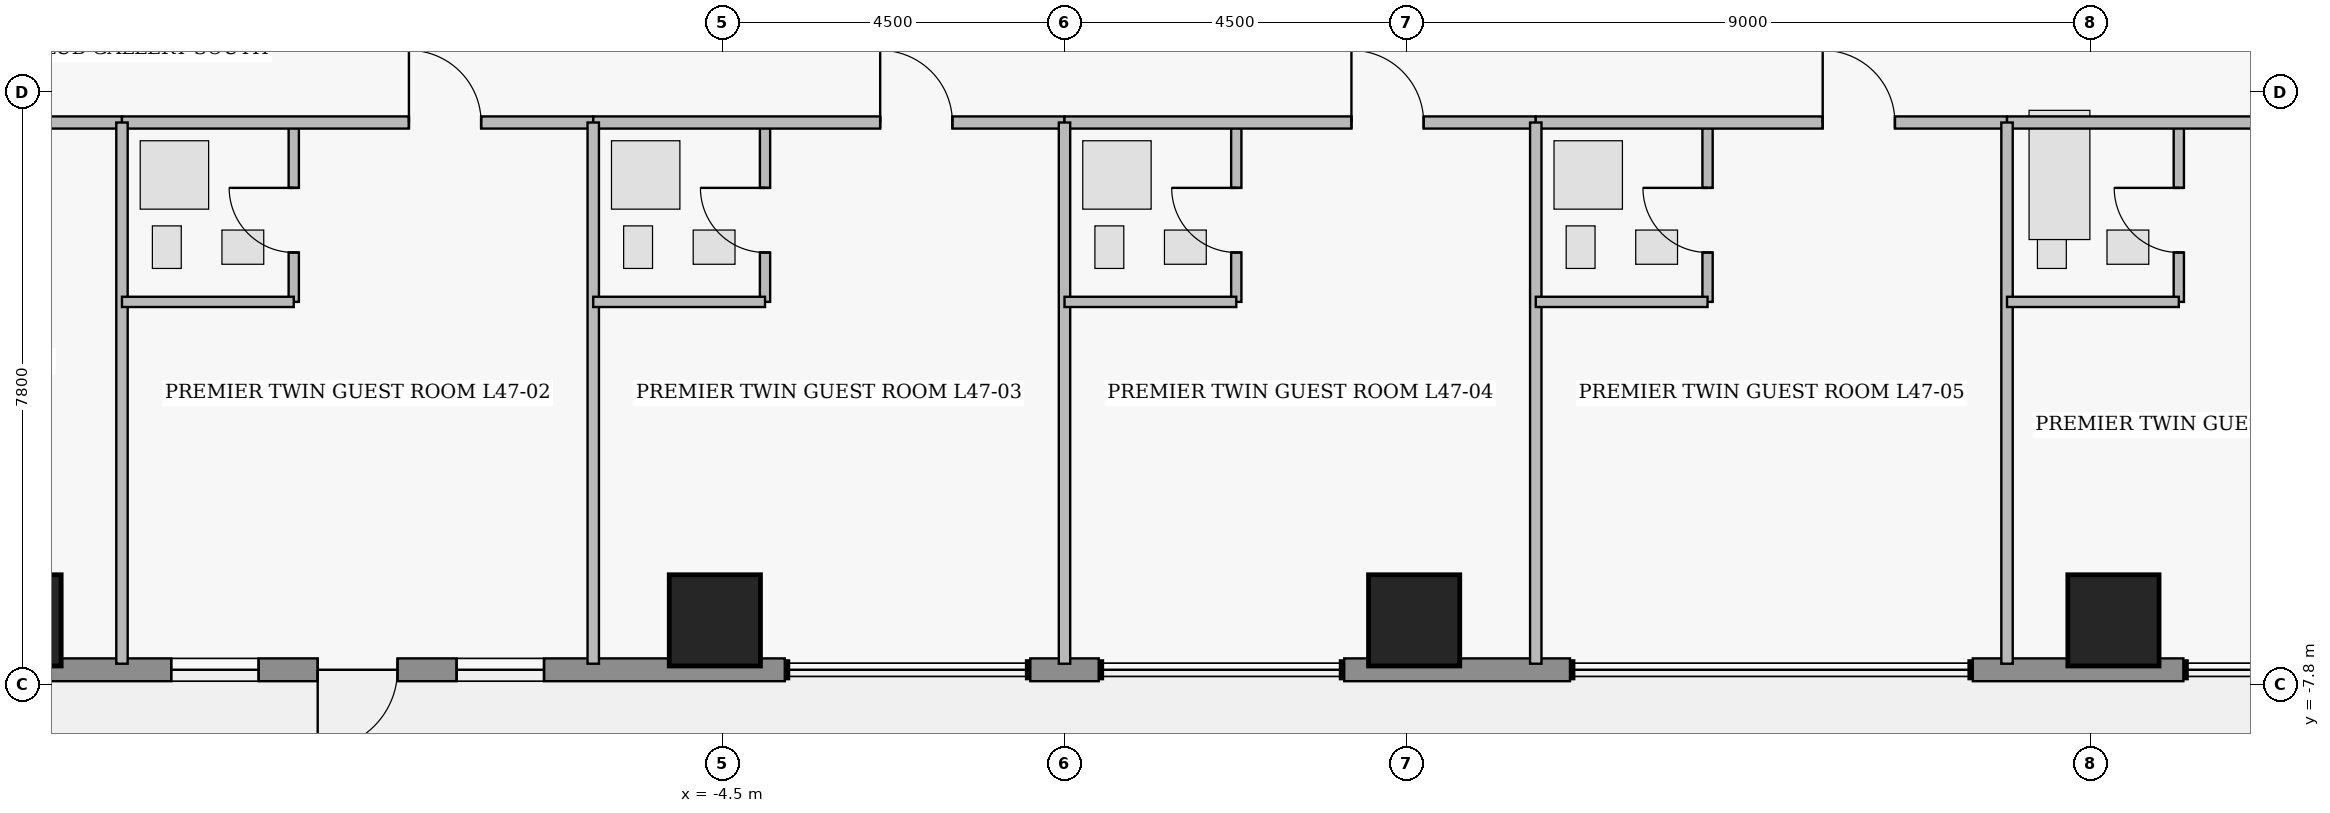
"""IFC4 building model, lengths in metres.
Left out: names, types, materials, properties, quantities, classifications, styles, units other than length and angle.
Written with IfcOpenShell. Run it as: python <this file> out.ifc"""

import sys

from ifc_helpers import new_model, si_unit, direction, frame, frame_2d, origin, origin_2d, place, context, subcontext, project, spatial, rectangle, extrude, element, fill, save


model = new_model("IFC4")
c1 = context("Model", 3, precision=1e-05, world=origin(), true_north=direction((0.0, 1.0)))
c2 = subcontext(c1, "Body", "Model", "MODEL_VIEW")
j1 = project(units=[si_unit("LENGTHUNIT", "METRE"), si_unit("PLANEANGLEUNIT", "RADIAN")], contexts=[c1])
p1 = place(None, origin())
s1 = spatial("IfcSite", under=j1, at=p1, CompositionType="ELEMENT")
p2 = place(p1, origin())
s2 = spatial("IfcBuilding", under=s1, at=p2, CompositionType="ELEMENT")
p3 = place(p2, frame((0.0, 0.0, 188.65)))
s3 = spatial("IfcBuildingStorey", under=s2, at=p3, CompositionType="ELEMENT", Elevation=188.65)
for number, where, z_axis, x_axis in (
    (1, (-13.8, -6.95, 0.0), (0.0, 0.0, 1.0), (1.0, 0.0, 0.0)),
    (2, (-4.6, -6.95, 0.0), (0.0, 0.0, 1.0), (1.0, 0.0, 0.0)),
    (3, (4.6, -6.95, 0.0), (0.0, 0.0, 1.0), (1.0, 0.0, 0.0)),
    (4, (13.8, -6.95, 0.0), (0.0, 0.0, 1.0), (1.0, 0.0, 0.0)),
):
    element("IfcColumn", number, at=place(p3, frame(where, z_axis=z_axis, x_axis=x_axis)), inside=s3, PredefinedType="COLUMN", context=c2, shape_type="SweptSolid", body=[
        extrude(rectangle(XDim=1.2, YDim=1.2, at=origin_2d()), origin(), (0.0, 0.0, 1.0), 3.75),
    ])
p4 = place(p3, frame((14.72, -7.6, 0.0), z_axis=(0.0, 0.0, 1.0), x_axis=(-1.0, 0.0, 0.0)))
e5 = element("IfcWall", 5, at=p4, inside=s3, PredefinedType="STANDARD", context=c2, shape_type="SweptSolid", body=[
    extrude(rectangle(XDim=2.77, YDim=0.3, at=frame_2d((1.385, 0.0))), origin(), (0.0, 0.0, 1.0), 3.53),
])
p5 = place(p3, frame((6.65, -7.6, 0.0), z_axis=(0.0, 0.0, 1.0), x_axis=(-1.0, 0.0, 0.0)))
e6 = element("IfcWall", 6, at=p5, inside=s3, PredefinedType="STANDARD", context=c2, shape_type="SweptSolid", body=[
    extrude(rectangle(XDim=2.97, YDim=0.3, at=frame_2d((1.485, 0.0))), origin(), (0.0, 0.0, 1.0), 3.53),
])
p6 = place(p3, frame((0.45, -7.6, 0.0), z_axis=(0.0, 0.0, 1.0), x_axis=(-1.0, 0.0, 0.0)))
e7 = element("IfcWall", 7, at=p6, inside=s3, PredefinedType="STANDARD", context=c2, shape_type="SweptSolid", body=[
    extrude(rectangle(XDim=0.9, YDim=0.3, at=frame_2d((0.45, 0.0))), origin(), (0.0, 0.0, 1.0), 3.53),
])
p7 = place(p3, frame((-3.68, -7.6, 0.0), z_axis=(0.0, 0.0, 1.0), x_axis=(-1.0, 0.0, 0.0)))
e8 = element("IfcWall", 8, at=p7, inside=s3, PredefinedType="STANDARD", context=c2, shape_type="SweptSolid", body=[
    extrude(rectangle(XDim=11.04, YDim=0.3, at=frame_2d((5.52, 0.0))), origin(), (0.0, 0.0, 1.0), 3.53),
])
p8 = place(p7, frame((5.095, 0.0, 0.0)))
e9 = element("IfcOpeningElement", 9, at=p8, cuts=e8, PredefinedType="OPENING", context=c2, shape_type="SweptSolid", body=[
    extrude(rectangle(XDim=1.05, YDim=2.2, at=frame_2d((0.525, 1.1))), frame((0.0, 0.16, 0.0), z_axis=(0.0, -1.0, 0.0), x_axis=(1.0, 0.0, 0.0)), (0.0, 0.0, 1.0), 0.32),
])
p9 = place(p7, frame((3.167, 0.0, 0.95)))
e10 = element("IfcOpeningElement", 10, at=p9, cuts=e8, PredefinedType="OPENING", context=c2, shape_type="SweptSolid", body=[
    extrude(rectangle(XDim=1.15, YDim=1.55, at=frame_2d((0.575, 0.775))), frame((0.0, 0.16, 0.0), z_axis=(0.0, -1.0, 0.0), x_axis=(1.0, 0.0, 0.0)), (0.0, 0.0, 1.0), 0.32),
])
p10 = place(p7, frame((6.923, 0.0, 0.95)))
e11 = element("IfcOpeningElement", 11, at=p10, cuts=e8, PredefinedType="OPENING", context=c2, shape_type="SweptSolid", body=[
    extrude(rectangle(XDim=1.15, YDim=1.55, at=frame_2d((0.575, 0.775))), frame((0.0, 0.16, 0.0), z_axis=(0.0, -1.0, 0.0), x_axis=(1.0, 0.0, 0.0)), (0.0, 0.0, 1.0), 0.32),
])
p11 = place(p3, frame((-22.04, -0.4, 0.0), z_axis=(0.0, 0.0, 1.0), x_axis=(1.0, 0.0, 0.0)))
e12 = element("IfcWall", 12, at=p11, inside=s3, PredefinedType="PARTITIONING", context=c2, shape_type="SweptSolid", body=[
    extrude(rectangle(XDim=9.64, YDim=0.16, at=frame_2d((4.82, 0.0))), origin(), (0.0, 0.0, 1.0), 3.53),
])
p12 = place(p11, frame((5.47, 0.0, 0.0)))
e13 = element("IfcOpeningElement", 13, at=p12, cuts=e12, PredefinedType="OPENING", context=c2, shape_type="SweptSolid", body=[
    extrude(rectangle(XDim=1.0, YDim=2.15, at=frame_2d((0.5, 1.075))), frame((0.0, 0.09, 0.0), z_axis=(0.0, -1.0, 0.0), x_axis=(1.0, 0.0, 0.0)), (0.0, 0.0, 1.0), 0.18),
])
p13 = place(p3, frame((-10.14, -2.76, 0.0), z_axis=(0.0, 0.0, 1.0), x_axis=(0.0, 1.0, 0.0)))
e14 = element("IfcWall", 14, at=p13, inside=s3, PredefinedType="PLUMBINGWALL", context=c2, shape_type="SweptSolid", body=[
    extrude(rectangle(XDim=2.36, YDim=0.135, at=frame_2d((1.18, 0.0))), origin(), (0.0, 0.0, 1.0), 3.53),
])
p14 = place(p13, frame((0.65, 0.0, 0.0)))
e15 = element("IfcOpeningElement", 15, at=p14, cuts=e14, PredefinedType="OPENING", context=c2, shape_type="SweptSolid", body=[
    extrude(rectangle(XDim=0.85, YDim=2.1, at=frame_2d((0.425, 1.05))), frame((0.0, 0.077, 0.0), z_axis=(0.0, -1.0, 0.0), x_axis=(1.0, 0.0, 0.0)), (0.0, 0.0, 1.0), 0.155),
])
p15 = place(p3, frame((-12.4, -0.4, 0.0), z_axis=(0.0, 0.0, 1.0), x_axis=(1.0, 0.0, 0.0)))
e16 = element("IfcWall", 16, at=p15, inside=s3, PredefinedType="PARTITIONING", context=c2, shape_type="SweptSolid", body=[
    extrude(rectangle(XDim=6.2, YDim=0.16, at=frame_2d((3.1, 0.0))), origin(), (0.0, 0.0, 1.0), 3.53),
])
p16 = place(p15, frame((3.775, 0.0, 0.0)))
e17 = element("IfcOpeningElement", 17, at=p16, cuts=e16, PredefinedType="OPENING", context=c2, shape_type="SweptSolid", body=[
    extrude(rectangle(XDim=0.95, YDim=2.15, at=frame_2d((0.475, 1.075))), frame((0.0, 0.09, 0.0), z_axis=(0.0, -1.0, 0.0), x_axis=(1.0, 0.0, 0.0)), (0.0, 0.0, 1.0), 0.18),
])
p17 = place(p3, frame((-3.94, -2.76, 0.0), z_axis=(0.0, 0.0, 1.0), x_axis=(0.0, 1.0, 0.0)))
e18 = element("IfcWall", 18, at=p17, inside=s3, PredefinedType="PLUMBINGWALL", context=c2, shape_type="SweptSolid", body=[
    extrude(rectangle(XDim=2.36, YDim=0.135, at=frame_2d((1.18, 0.0))), origin(), (0.0, 0.0, 1.0), 3.53),
])
p18 = place(p17, frame((0.65, 0.0, 0.0)))
e19 = element("IfcOpeningElement", 19, at=p18, cuts=e18, PredefinedType="OPENING", context=c2, shape_type="SweptSolid", body=[
    extrude(rectangle(XDim=0.85, YDim=2.1, at=frame_2d((0.425, 1.05))), frame((0.0, 0.077, 0.0), z_axis=(0.0, -1.0, 0.0), x_axis=(1.0, 0.0, 0.0)), (0.0, 0.0, 1.0), 0.155),
])
p19 = place(p3, frame((-6.2, -0.4, 0.0), z_axis=(0.0, 0.0, 1.0), x_axis=(1.0, 0.0, 0.0)))
e20 = element("IfcWall", 20, at=p19, inside=s3, PredefinedType="PARTITIONING", context=c2, shape_type="SweptSolid", body=[
    extrude(rectangle(XDim=6.2, YDim=0.16, at=frame_2d((3.1, 0.0))), origin(), (0.0, 0.0, 1.0), 3.53),
])
p20 = place(p19, frame((3.775, 0.0, 0.0)))
e21 = element("IfcOpeningElement", 21, at=p20, cuts=e20, PredefinedType="OPENING", context=c2, shape_type="SweptSolid", body=[
    extrude(rectangle(XDim=0.95, YDim=2.15, at=frame_2d((0.475, 1.075))), frame((0.0, 0.09, 0.0), z_axis=(0.0, -1.0, 0.0), x_axis=(1.0, 0.0, 0.0)), (0.0, 0.0, 1.0), 0.18),
])
p21 = place(p3, frame((2.26, -2.76, 0.0), z_axis=(0.0, 0.0, 1.0), x_axis=(0.0, 1.0, 0.0)))
e22 = element("IfcWall", 22, at=p21, inside=s3, PredefinedType="PLUMBINGWALL", context=c2, shape_type="SweptSolid", body=[
    extrude(rectangle(XDim=2.36, YDim=0.135, at=frame_2d((1.18, 0.0))), origin(), (0.0, 0.0, 1.0), 3.53),
])
p22 = place(p21, frame((0.65, 0.0, 0.0)))
e23 = element("IfcOpeningElement", 23, at=p22, cuts=e22, PredefinedType="OPENING", context=c2, shape_type="SweptSolid", body=[
    extrude(rectangle(XDim=0.85, YDim=2.1, at=frame_2d((0.425, 1.05))), frame((0.0, 0.077, 0.0), z_axis=(0.0, -1.0, 0.0), x_axis=(1.0, 0.0, 0.0)), (0.0, 0.0, 1.0), 0.155),
])
p23 = place(p3, frame((0.0, -0.4, 0.0), z_axis=(0.0, 0.0, 1.0), x_axis=(1.0, 0.0, 0.0)))
e24 = element("IfcWall", 24, at=p23, inside=s3, PredefinedType="PARTITIONING", context=c2, shape_type="SweptSolid", body=[
    extrude(rectangle(XDim=6.2, YDim=0.16, at=frame_2d((3.1, 0.0))), origin(), (0.0, 0.0, 1.0), 3.53),
])
p24 = place(p23, frame((3.775, 0.0, 0.0)))
e25 = element("IfcOpeningElement", 25, at=p24, cuts=e24, PredefinedType="OPENING", context=c2, shape_type="SweptSolid", body=[
    extrude(rectangle(XDim=0.95, YDim=2.15, at=frame_2d((0.475, 1.075))), frame((0.0, 0.09, 0.0), z_axis=(0.0, -1.0, 0.0), x_axis=(1.0, 0.0, 0.0)), (0.0, 0.0, 1.0), 0.18),
])
p25 = place(p3, frame((8.46, -2.76, 0.0), z_axis=(0.0, 0.0, 1.0), x_axis=(0.0, 1.0, 0.0)))
e26 = element("IfcWall", 26, at=p25, inside=s3, PredefinedType="PLUMBINGWALL", context=c2, shape_type="SweptSolid", body=[
    extrude(rectangle(XDim=2.36, YDim=0.135, at=frame_2d((1.18, 0.0))), origin(), (0.0, 0.0, 1.0), 3.53),
])
p26 = place(p25, frame((0.65, 0.0, 0.0)))
e27 = element("IfcOpeningElement", 27, at=p26, cuts=e26, PredefinedType="OPENING", context=c2, shape_type="SweptSolid", body=[
    extrude(rectangle(XDim=0.85, YDim=2.1, at=frame_2d((0.425, 1.05))), frame((0.0, 0.077, 0.0), z_axis=(0.0, -1.0, 0.0), x_axis=(1.0, 0.0, 0.0)), (0.0, 0.0, 1.0), 0.155),
])
p27 = place(p3, frame((6.2, -0.4, 0.0), z_axis=(0.0, 0.0, 1.0), x_axis=(1.0, 0.0, 0.0)))
e28 = element("IfcWall", 28, at=p27, inside=s3, PredefinedType="PARTITIONING", context=c2, shape_type="SweptSolid", body=[
    extrude(rectangle(XDim=6.2, YDim=0.16, at=frame_2d((3.1, 0.0))), origin(), (0.0, 0.0, 1.0), 3.53),
])
p28 = place(p27, frame((3.775, 0.0, 0.0)))
e29 = element("IfcOpeningElement", 29, at=p28, cuts=e28, PredefinedType="OPENING", context=c2, shape_type="SweptSolid", body=[
    extrude(rectangle(XDim=0.95, YDim=2.15, at=frame_2d((0.475, 1.075))), frame((0.0, 0.09, 0.0), z_axis=(0.0, -1.0, 0.0), x_axis=(1.0, 0.0, 0.0)), (0.0, 0.0, 1.0), 0.18),
])
p29 = place(p3, frame((14.66, -2.76, 0.0), z_axis=(0.0, 0.0, 1.0), x_axis=(0.0, 1.0, 0.0)))
e30 = element("IfcWall", 30, at=p29, inside=s3, PredefinedType="PLUMBINGWALL", context=c2, shape_type="SweptSolid", body=[
    extrude(rectangle(XDim=2.36, YDim=0.135, at=frame_2d((1.18, 0.0))), origin(), (0.0, 0.0, 1.0), 3.53),
])
p30 = place(p29, frame((0.65, 0.0, 0.0)))
e31 = element("IfcOpeningElement", 31, at=p30, cuts=e30, PredefinedType="OPENING", context=c2, shape_type="SweptSolid", body=[
    extrude(rectangle(XDim=0.85, YDim=2.1, at=frame_2d((0.425, 1.05))), frame((0.0, 0.077, 0.0), z_axis=(0.0, -1.0, 0.0), x_axis=(1.0, 0.0, 0.0)), (0.0, 0.0, 1.0), 0.155),
])
p31 = place(p3, frame((12.4, -0.4, 0.0), z_axis=(0.0, 0.0, 1.0), x_axis=(1.0, 0.0, 0.0)))
e32 = element("IfcWall", 32, at=p31, inside=s3, PredefinedType="PARTITIONING", context=c2, shape_type="SweptSolid", body=[
    extrude(rectangle(XDim=9.64, YDim=0.16, at=frame_2d((4.82, 0.0))), origin(), (0.0, 0.0, 1.0), 3.53),
])
p32 = place(p31, frame((5.47, 0.0, 0.0)))
e33 = element("IfcOpeningElement", 33, at=p32, cuts=e32, PredefinedType="OPENING", context=c2, shape_type="SweptSolid", body=[
    extrude(rectangle(XDim=1.0, YDim=2.15, at=frame_2d((0.5, 1.075))), frame((0.0, 0.09, 0.0), z_axis=(0.0, -1.0, 0.0), x_axis=(1.0, 0.0, 0.0)), (0.0, 0.0, 1.0), 0.18),
])
p33 = place(p3, frame((-12.4, -7.52, 0.0), z_axis=(0.0, 0.0, 1.0), x_axis=(0.0, 1.0, 0.0)))
e34 = element("IfcWall", 34, at=p33, inside=s3, PredefinedType="PARTITIONING", context=c2, shape_type="SweptSolid", body=[
    extrude(rectangle(XDim=7.12, YDim=0.15, at=frame_2d((3.56, 0.0))), origin(), (0.0, 0.0, 1.0), 3.53),
])
p34 = place(p3, frame((-12.4, -2.76, 0.0), z_axis=(0.0, 0.0, 1.0), x_axis=(1.0, 0.0, 0.0)))
e35 = element("IfcWall", 35, at=p34, inside=s3, PredefinedType="PLUMBINGWALL", context=c2, shape_type="SweptSolid", body=[
    extrude(rectangle(XDim=2.26, YDim=0.135, at=frame_2d((1.13, 0.0))), origin(), (0.0, 0.0, 1.0), 3.124),
])
p35 = place(p3, frame((-6.2, -7.52, 0.0), z_axis=(0.0, 0.0, 1.0), x_axis=(0.0, 1.0, 0.0)))
e36 = element("IfcWall", 36, at=p35, inside=s3, PredefinedType="PARTITIONING", context=c2, shape_type="SweptSolid", body=[
    extrude(rectangle(XDim=7.12, YDim=0.15, at=frame_2d((3.56, 0.0))), origin(), (0.0, 0.0, 1.0), 3.53),
])
p36 = place(p3, frame((-6.2, -2.76, 0.0), z_axis=(0.0, 0.0, 1.0), x_axis=(1.0, 0.0, 0.0)))
e37 = element("IfcWall", 37, at=p36, inside=s3, PredefinedType="PLUMBINGWALL", context=c2, shape_type="SweptSolid", body=[
    extrude(rectangle(XDim=2.26, YDim=0.135, at=frame_2d((1.13, 0.0))), origin(), (0.0, 0.0, 1.0), 3.124),
])
p37 = place(p3, frame((0.0, -7.52, 0.0), z_axis=(0.0, 0.0, 1.0), x_axis=(0.0, 1.0, 0.0)))
e38 = element("IfcWall", 38, at=p37, inside=s3, PredefinedType="PARTITIONING", context=c2, shape_type="SweptSolid", body=[
    extrude(rectangle(XDim=7.12, YDim=0.15, at=frame_2d((3.56, 0.0))), origin(), (0.0, 0.0, 1.0), 3.53),
])
p38 = place(p3, frame((0.0, -2.76, 0.0), z_axis=(0.0, 0.0, 1.0), x_axis=(1.0, 0.0, 0.0)))
e39 = element("IfcWall", 39, at=p38, inside=s3, PredefinedType="PLUMBINGWALL", context=c2, shape_type="SweptSolid", body=[
    extrude(rectangle(XDim=2.26, YDim=0.135, at=frame_2d((1.13, 0.0))), origin(), (0.0, 0.0, 1.0), 3.124),
])
p39 = place(p3, frame((6.2, -7.52, 0.0), z_axis=(0.0, 0.0, 1.0), x_axis=(0.0, 1.0, 0.0)))
e40 = element("IfcWall", 40, at=p39, inside=s3, PredefinedType="PARTITIONING", context=c2, shape_type="SweptSolid", body=[
    extrude(rectangle(XDim=7.12, YDim=0.15, at=frame_2d((3.56, 0.0))), origin(), (0.0, 0.0, 1.0), 3.53),
])
p40 = place(p3, frame((6.2, -2.76, 0.0), z_axis=(0.0, 0.0, 1.0), x_axis=(1.0, 0.0, 0.0)))
e41 = element("IfcWall", 41, at=p40, inside=s3, PredefinedType="PLUMBINGWALL", context=c2, shape_type="SweptSolid", body=[
    extrude(rectangle(XDim=2.26, YDim=0.135, at=frame_2d((1.13, 0.0))), origin(), (0.0, 0.0, 1.0), 3.124),
])
p41 = place(p3, frame((12.4, -7.52, 0.0), z_axis=(0.0, 0.0, 1.0), x_axis=(0.0, 1.0, 0.0)))
e42 = element("IfcWall", 42, at=p41, inside=s3, PredefinedType="PARTITIONING", context=c2, shape_type="SweptSolid", body=[
    extrude(rectangle(XDim=7.12, YDim=0.15, at=frame_2d((3.56, 0.0))), origin(), (0.0, 0.0, 1.0), 3.53),
])
p42 = place(p3, frame((12.4, -2.76, 0.0), z_axis=(0.0, 0.0, 1.0), x_axis=(1.0, 0.0, 0.0)))
e43 = element("IfcWall", 43, at=p42, inside=s3, PredefinedType="PLUMBINGWALL", context=c2, shape_type="SweptSolid", body=[
    extrude(rectangle(XDim=2.26, YDim=0.135, at=frame_2d((1.13, 0.0))), origin(), (0.0, 0.0, 1.0), 3.124),
])
p43 = place(p8, origin())
e44 = element("IfcDoor", 44, at=p43, inside=s3, OperationType="SINGLE_SWING_RIGHT", PredefinedType="DOOR", context=c2, shape_type="SweptSolid", body=[
    extrude(rectangle(XDim=1.05, YDim=2.2, at=frame_2d((0.525, 1.1))), frame((0.0, 0.025, 0.0), z_axis=(0.0, -1.0, 0.0), x_axis=(1.0, 0.0, 0.0)), (0.0, 0.0, 1.0), 0.05),
])
fill(e9, e44)
p44 = place(p9, origin())
e45 = element("IfcWindow", 45, at=p44, inside=s3, PartitioningType="SINGLE_PANEL", PredefinedType="WINDOW", context=c2, shape_type="SweptSolid", body=[
    extrude(rectangle(XDim=1.15, YDim=1.55, at=frame_2d((0.575, 0.775))), frame((0.0, 0.03, 0.0), z_axis=(0.0, -1.0, 0.0), x_axis=(1.0, 0.0, 0.0)), (0.0, 0.0, 1.0), 0.06),
])
fill(e10, e45)
p45 = place(p10, origin())
e46 = element("IfcWindow", 46, at=p45, inside=s3, PartitioningType="SINGLE_PANEL", PredefinedType="WINDOW", context=c2, shape_type="SweptSolid", body=[
    extrude(rectangle(XDim=1.15, YDim=1.55, at=frame_2d((0.575, 0.775))), frame((0.0, 0.03, 0.0), z_axis=(0.0, -1.0, 0.0), x_axis=(1.0, 0.0, 0.0)), (0.0, 0.0, 1.0), 0.06),
])
fill(e11, e46)
p46 = place(p14, origin())
e47 = element("IfcDoor", 47, at=p46, inside=s3, OperationType="SINGLE_SWING_RIGHT", PredefinedType="DOOR", context=c2, shape_type="SweptSolid", body=[
    extrude(rectangle(XDim=0.85, YDim=2.1, at=frame_2d((0.425, 1.05))), frame((0.0, 0.025, 0.0), z_axis=(0.0, -1.0, 0.0), x_axis=(1.0, 0.0, 0.0)), (0.0, 0.0, 1.0), 0.05),
])
fill(e15, e47)
p47 = place(p16, origin())
e48 = element("IfcDoor", 48, at=p47, inside=s3, OperationType="SINGLE_SWING_LEFT", PredefinedType="DOOR", context=c2, shape_type="SweptSolid", body=[
    extrude(rectangle(XDim=0.95, YDim=2.15, at=frame_2d((0.475, 1.075))), frame((0.0, 0.025, 0.0), z_axis=(0.0, -1.0, 0.0), x_axis=(1.0, 0.0, 0.0)), (0.0, 0.0, 1.0), 0.05),
])
fill(e17, e48)
p48 = place(p18, origin())
e49 = element("IfcDoor", 49, at=p48, inside=s3, OperationType="SINGLE_SWING_RIGHT", PredefinedType="DOOR", context=c2, shape_type="SweptSolid", body=[
    extrude(rectangle(XDim=0.85, YDim=2.1, at=frame_2d((0.425, 1.05))), frame((0.0, 0.025, 0.0), z_axis=(0.0, -1.0, 0.0), x_axis=(1.0, 0.0, 0.0)), (0.0, 0.0, 1.0), 0.05),
])
fill(e19, e49)
p49 = place(p20, origin())
e50 = element("IfcDoor", 50, at=p49, inside=s3, OperationType="SINGLE_SWING_LEFT", PredefinedType="DOOR", context=c2, shape_type="SweptSolid", body=[
    extrude(rectangle(XDim=0.95, YDim=2.15, at=frame_2d((0.475, 1.075))), frame((0.0, 0.025, 0.0), z_axis=(0.0, -1.0, 0.0), x_axis=(1.0, 0.0, 0.0)), (0.0, 0.0, 1.0), 0.05),
])
fill(e21, e50)
p50 = place(p22, origin())
e51 = element("IfcDoor", 51, at=p50, inside=s3, OperationType="SINGLE_SWING_RIGHT", PredefinedType="DOOR", context=c2, shape_type="SweptSolid", body=[
    extrude(rectangle(XDim=0.85, YDim=2.1, at=frame_2d((0.425, 1.05))), frame((0.0, 0.025, 0.0), z_axis=(0.0, -1.0, 0.0), x_axis=(1.0, 0.0, 0.0)), (0.0, 0.0, 1.0), 0.05),
])
fill(e23, e51)
p51 = place(p24, origin())
e52 = element("IfcDoor", 52, at=p51, inside=s3, OperationType="SINGLE_SWING_LEFT", PredefinedType="DOOR", context=c2, shape_type="SweptSolid", body=[
    extrude(rectangle(XDim=0.95, YDim=2.15, at=frame_2d((0.475, 1.075))), frame((0.0, 0.025, 0.0), z_axis=(0.0, -1.0, 0.0), x_axis=(1.0, 0.0, 0.0)), (0.0, 0.0, 1.0), 0.05),
])
fill(e25, e52)
p52 = place(p26, origin())
e53 = element("IfcDoor", 53, at=p52, inside=s3, OperationType="SINGLE_SWING_RIGHT", PredefinedType="DOOR", context=c2, shape_type="SweptSolid", body=[
    extrude(rectangle(XDim=0.85, YDim=2.1, at=frame_2d((0.425, 1.05))), frame((0.0, 0.025, 0.0), z_axis=(0.0, -1.0, 0.0), x_axis=(1.0, 0.0, 0.0)), (0.0, 0.0, 1.0), 0.05),
])
fill(e27, e53)
p53 = place(p28, origin())
e54 = element("IfcDoor", 54, at=p53, inside=s3, OperationType="SINGLE_SWING_LEFT", PredefinedType="DOOR", context=c2, shape_type="SweptSolid", body=[
    extrude(rectangle(XDim=0.95, YDim=2.15, at=frame_2d((0.475, 1.075))), frame((0.0, 0.025, 0.0), z_axis=(0.0, -1.0, 0.0), x_axis=(1.0, 0.0, 0.0)), (0.0, 0.0, 1.0), 0.05),
])
fill(e29, e54)
p54 = place(p30, origin())
e55 = element("IfcDoor", 55, at=p54, inside=s3, OperationType="SINGLE_SWING_RIGHT", PredefinedType="DOOR", context=c2, shape_type="SweptSolid", body=[
    extrude(rectangle(XDim=0.85, YDim=2.1, at=frame_2d((0.425, 1.05))), frame((0.0, 0.025, 0.0), z_axis=(0.0, -1.0, 0.0), x_axis=(1.0, 0.0, 0.0)), (0.0, 0.0, 1.0), 0.05),
])
fill(e31, e55)
save(model, sys.argv[1])
